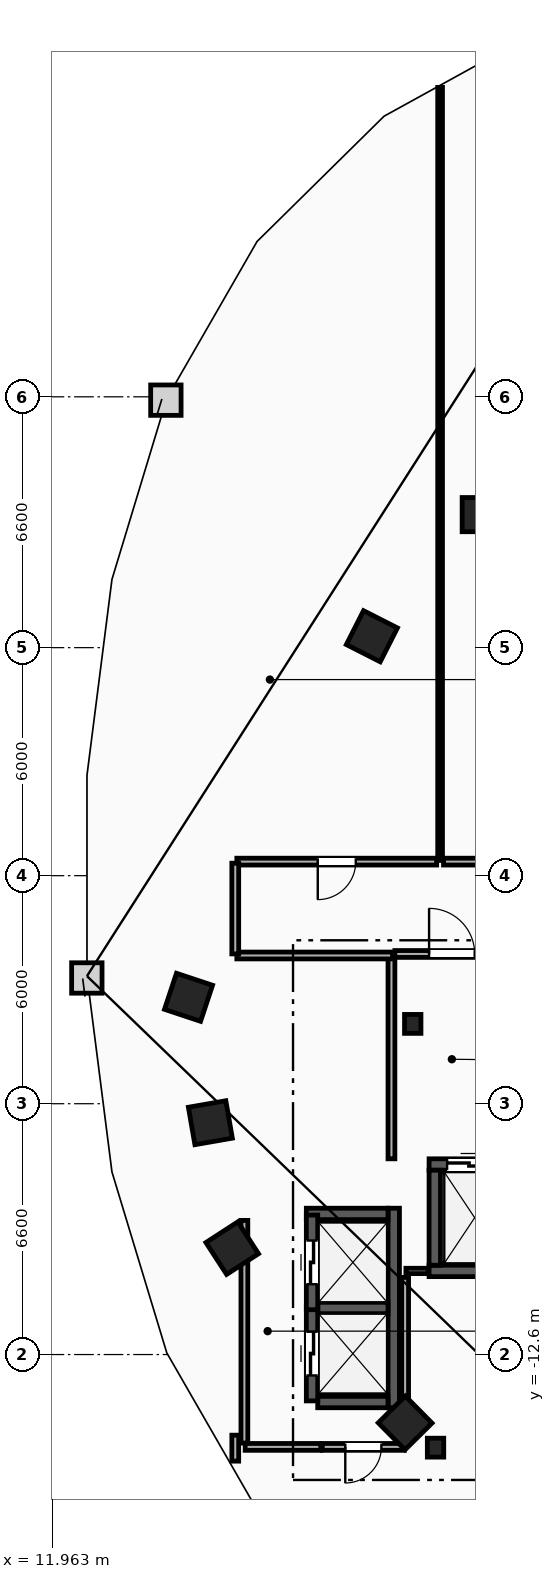
"""IFC4 building model, lengths in metres.
Left out: names, types, materials, properties, quantities, classifications, styles, units other than length and angle.
Written with IfcOpenShell. Run it as: python <this file> out.ifc"""

import sys

from ifc_helpers import new_model, si_unit, direction, frame, frame_2d, origin, origin_2d, place, context, subcontext, project, spatial, rectangle, i_section, extrude, element, fill, save


model = new_model("IFC4")
c1 = context("Model", 3, precision=1e-05, world=origin(), true_north=direction((0.0, 1.0)))
c2 = subcontext(c1, "Body", "Model", "MODEL_VIEW")
j1 = project(units=[si_unit("LENGTHUNIT", "METRE"), si_unit("PLANEANGLEUNIT", "RADIAN")], contexts=[c1])
p1 = place(None, origin())
s1 = spatial("IfcSite", under=j1, at=p1, CompositionType="ELEMENT")
p2 = place(p1, origin())
s2 = spatial("IfcBuilding", under=s1, at=p2, CompositionType="ELEMENT")
p3 = place(p2, frame((0.0, 0.0, 183.6)))
s3 = spatial("IfcBuildingStorey", under=s2, at=p3, CompositionType="ELEMENT", Elevation=183.6)
for number, where, z_axis, x_axis in (
    (1, (21.45, -3.9, 0.0), (0.0, 0.0, 1.0), (1.0, 0.0, 0.0)),
    (2, (22.05, -15.05, 0.0), (0.0, 0.0, 1.0), (1.0, 0.0, 0.0)),
):
    element("IfcColumn", number, at=place(p3, frame(where, z_axis=z_axis, x_axis=x_axis)), inside=s3, PredefinedType="COLUMN", context=c2, shape_type="SweptSolid", body=[
        extrude(i_section(OverallWidth=0.432, OverallDepth=0.498, WebThickness=0.056, FlangeThickness=0.089, FilletRadius=0.018, at=origin_2d()), origin(), (0.0, 0.0, 1.0), 3.6),
    ])
p4 = place(p3, frame((23.2, 9.5, 0.0), z_axis=(0.0, 0.0, 1.0), x_axis=(1.0, 0.0, 0.0)))
e3 = element("IfcColumn", 3, at=p4, inside=s3, PredefinedType="COLUMN", context=c2, shape_type="SweptSolid", body=[
    extrude(rectangle(XDim=0.9, YDim=0.9, at=origin_2d()), origin(), (0.0, 0.0, 1.0), 3.6),
])
for number, where, z_axis, x_axis in (
    (4, (15.55, -3.2, 0.0), (0.0, 0.0, 1.0), (-0.315, -0.949, 0.0)),
    (5, (16.125, -6.5, 0.0), (0.0, 0.0, 1.0), (0.172, -0.985, 0.0)),
    (6, (16.7, -9.8, 0.0), (0.0, 0.0, 1.0), (0.544, -0.839, 0.0)),
    (7, (21.25, -14.4, 0.0), (0.0, 0.0, 1.0), (0.703, -0.711, 0.0)),
    (8, (20.375, 6.3, 0.0), (0.0, 0.0, 1.0), (-0.453, -0.892, 0.0)),
):
    element("IfcColumn", number, at=place(p3, frame(where, z_axis=z_axis, x_axis=x_axis)), inside=s3, PredefinedType="COLUMN", context=c2, shape_type="SweptSolid", body=[
        extrude(rectangle(XDim=1.0, YDim=1.0, at=origin_2d()), origin(), (0.0, 0.0, 1.0), 3.6),
    ])
p5 = place(p3, frame((20.89, -7.45, 0.0), z_axis=(0.0, 0.0, 1.0), x_axis=(0.0, 1.0, 0.0)))
e9 = element("IfcWall", 9, at=p5, inside=s3, PredefinedType="PARTITIONING", context=c2, shape_type="SweptSolid", body=[
    extrude(rectangle(XDim=5.3, YDim=0.18, at=frame_2d((2.65, 0.0))), origin(), (0.0, 0.0, 1.0), 3.32),
])
p6 = place(p3, frame((20.98, -2.06, 0.0), z_axis=(0.0, 0.0, 1.0), x_axis=(1.0, 0.0, 0.0)))
e10 = element("IfcWall", 10, at=p6, inside=s3, PredefinedType="PARTITIONING", context=c2, shape_type="SweptSolid", body=[
    extrude(rectangle(XDim=3.0, YDim=0.18, at=frame_2d((1.5, 0.0))), origin(), (0.0, 0.0, 1.0), 3.32),
])
p7 = place(p6, frame((0.9, 0.0, 0.0)))
e11 = element("IfcOpeningElement", 11, at=p7, cuts=e10, PredefinedType="OPENING", context=c2, shape_type="SweptSolid", body=[
    extrude(rectangle(XDim=1.2, YDim=2.15, at=frame_2d((0.6, 1.075))), frame((0.0, 0.1, 0.0), z_axis=(0.0, -1.0, 0.0), x_axis=(1.0, 0.0, 0.0)), (0.0, 0.0, 1.0), 0.2),
])
p8 = place(p3, frame((21.88, -7.6, 0.0), z_axis=(0.0, 0.0, 1.0), x_axis=(1.0, 0.0, 0.0)))
e12 = element("IfcWall", 12, at=p8, inside=s3, PredefinedType="SHEAR", context=c2, shape_type="SweptSolid", body=[
    extrude(rectangle(XDim=2.1, YDim=0.3, at=frame_2d((1.05, 0.0))), origin(), (0.0, 0.0, 1.0), 3.32),
])
p9 = place(p8, frame((0.475, 0.0, 0.0)))
e13 = element("IfcOpeningElement", 13, at=p9, cuts=e12, PredefinedType="OPENING", context=c2, shape_type="SweptSolid", body=[
    extrude(rectangle(XDim=1.15, YDim=2.2, at=frame_2d((0.575, 1.1))), frame((0.0, 0.16, 0.0), z_axis=(0.0, -1.0, 0.0), x_axis=(1.0, 0.0, 0.0)), (0.0, 0.0, 1.0), 0.32),
])
p10 = place(p3, frame((21.88, -10.4, 0.0), z_axis=(0.0, 0.0, 1.0), x_axis=(1.0, 0.0, 0.0)))
e14 = element("IfcWall", 14, at=p10, inside=s3, PredefinedType="SHEAR", context=c2, shape_type="SweptSolid", body=[
    extrude(rectangle(XDim=2.1, YDim=0.3, at=frame_2d((1.05, 0.0))), origin(), (0.0, 0.0, 1.0), 3.32),
])
p11 = place(p3, frame((22.03, -10.25, 0.0), z_axis=(0.0, 0.0, 1.0), x_axis=(0.0, 1.0, 0.0)))
e15 = element("IfcWall", 15, at=p11, inside=s3, PredefinedType="SHEAR", context=c2, shape_type="SweptSolid", body=[
    extrude(rectangle(XDim=2.5, YDim=0.3, at=frame_2d((1.25, 0.0))), origin(), (0.0, 0.0, 1.0), 3.32),
])
p12 = place(p3, frame((20.95, -14.0, 0.0), z_axis=(0.0, 0.0, 1.0), x_axis=(0.0, 1.0, 0.0)))
e16 = element("IfcWall", 16, at=p12, inside=s3, PredefinedType="SHEAR", context=c2, shape_type="SweptSolid", body=[
    extrude(rectangle(XDim=5.25, YDim=0.3, at=frame_2d((2.625, 0.0))), origin(), (0.0, 0.0, 1.0), 3.32),
])
p13 = place(p3, frame((18.95, -13.85, 0.0), z_axis=(0.0, 0.0, 1.0), x_axis=(1.0, 0.0, 0.0)))
e17 = element("IfcWall", 17, at=p13, inside=s3, PredefinedType="SHEAR", context=c2, shape_type="SweptSolid", body=[
    extrude(rectangle(XDim=1.85, YDim=0.3, at=frame_2d((0.925, 0.0))), origin(), (0.0, 0.0, 1.0), 3.32),
])
p14 = place(p3, frame((18.65, -8.9, 0.0), z_axis=(0.0, 0.0, 1.0), x_axis=(1.0, 0.0, 0.0)))
e18 = element("IfcWall", 18, at=p14, inside=s3, PredefinedType="SHEAR", context=c2, shape_type="SweptSolid", body=[
    extrude(rectangle(XDim=2.15, YDim=0.3, at=frame_2d((1.075, 0.0))), origin(), (0.0, 0.0, 1.0), 3.32),
])
p15 = place(p3, frame((18.95, -11.375, 0.0), z_axis=(0.0, 0.0, 1.0), x_axis=(1.0, 0.0, 0.0)))
e19 = element("IfcWall", 19, at=p15, inside=s3, PredefinedType="SHEAR", context=c2, shape_type="SweptSolid", body=[
    extrude(rectangle(XDim=1.85, YDim=0.3, at=frame_2d((0.925, 0.0))), origin(), (0.0, 0.0, 1.0), 3.32),
])
p16 = place(p3, frame((18.8, -13.82, 0.0), z_axis=(0.0, 0.0, 1.0), x_axis=(0.0, 1.0, 0.0)))
e20 = element("IfcWall", 20, at=p16, inside=s3, PredefinedType="SHEAR", context=c2, shape_type="SweptSolid", body=[
    extrude(rectangle(XDim=2.49, YDim=0.3, at=frame_2d((1.245, 0.0))), origin(), (0.0, 0.0, 1.0), 3.32),
])
p17 = place(p16, frame((0.67, 0.0, 0.0)))
e21 = element("IfcOpeningElement", 21, at=p17, cuts=e20, PredefinedType="OPENING", context=c2, shape_type="SweptSolid", body=[
    extrude(rectangle(XDim=1.15, YDim=2.2, at=frame_2d((0.575, 1.1))), frame((0.0, 0.16, 0.0), z_axis=(0.0, -1.0, 0.0), x_axis=(1.0, 0.0, 0.0)), (0.0, 0.0, 1.0), 0.32),
])
p18 = place(p3, frame((18.8, -11.42, 0.0), z_axis=(0.0, 0.0, 1.0), x_axis=(0.0, 1.0, 0.0)))
e22 = element("IfcWall", 22, at=p18, inside=s3, PredefinedType="SHEAR", context=c2, shape_type="SweptSolid", body=[
    extrude(rectangle(XDim=2.49, YDim=0.3, at=frame_2d((1.245, 0.0))), origin(), (0.0, 0.0, 1.0), 3.32),
])
p19 = place(p18, frame((0.67, 0.0, 0.0)))
e23 = element("IfcOpeningElement", 23, at=p19, cuts=e22, PredefinedType="OPENING", context=c2, shape_type="SweptSolid", body=[
    extrude(rectangle(XDim=1.15, YDim=2.2, at=frame_2d((0.575, 1.1))), frame((0.0, 0.16, 0.0), z_axis=(0.0, -1.0, 0.0), x_axis=(1.0, 0.0, 0.0)), (0.0, 0.0, 1.0), 0.32),
])
p20 = place(p3, frame((17.02, -14.93, 0.0), z_axis=(0.0, 0.0, 1.0), x_axis=(0.0, 1.0, 0.0)))
e24 = element("IfcWall", 24, at=p20, inside=s3, PredefinedType="PARTITIONING", context=c2, shape_type="SweptSolid", body=[
    extrude(rectangle(XDim=5.86, YDim=0.18, at=frame_2d((2.93, 0.0))), origin(), (0.0, 0.0, 1.0), 3.32),
])
p21 = place(p3, frame((17.04, -15.03, 0.0), z_axis=(0.0, 0.0, 1.0), x_axis=(1.0, 0.0, 0.0)))
e25 = element("IfcWall", 25, at=p21, inside=s3, PredefinedType="PARTITIONING", context=c2, shape_type="SweptSolid", body=[
    extrude(rectangle(XDim=1.99, YDim=0.18, at=frame_2d((0.995, 0.0))), origin(), (0.0, 0.0, 1.0), 3.32),
])
p22 = place(p3, frame((21.23, -15.03, 0.0), z_axis=(0.0, 0.0, 1.0), x_axis=(-1.0, 0.0, 0.0)))
e26 = element("IfcWall", 26, at=p22, inside=s3, PredefinedType="PARTITIONING", context=c2, shape_type="SweptSolid", body=[
    extrude(rectangle(XDim=2.16, YDim=0.18, at=frame_2d((1.08, 0.0))), origin(), (0.0, 0.0, 1.0), 3.32),
])
p23 = place(p22, frame((0.605, 0.0, 0.0)))
e27 = element("IfcOpeningElement", 27, at=p23, cuts=e26, PredefinedType="OPENING", context=c2, shape_type="SweptSolid", body=[
    extrude(rectangle(XDim=0.95, YDim=2.1, at=frame_2d((0.475, 1.05))), frame((0.0, 0.1, 0.0), z_axis=(0.0, -1.0, 0.0), x_axis=(1.0, 0.0, 0.0)), (0.0, 0.0, 1.0), 0.2),
])
p24 = place(p3, frame((21.27, -10.4, 0.0), z_axis=(0.0, 0.0, 1.0), x_axis=(1.0, 0.0, 0.0)))
e28 = element("IfcWall", 28, at=p24, inside=s3, PredefinedType="PARTITIONING", context=c2, shape_type="SweptSolid", body=[
    extrude(rectangle(XDim=0.59, YDim=0.14, at=frame_2d((0.295, 0.0))), origin(), (0.0, 0.0, 1.0), 3.32),
])
p25 = place(p3, frame((21.25, -14.93, 0.0), z_axis=(0.0, 0.0, 1.0), x_axis=(0.0, 1.0, 0.0)))
e29 = element("IfcWall", 29, at=p25, inside=s3, PredefinedType="PARTITIONING", context=c2, shape_type="SweptSolid", body=[
    extrude(rectangle(XDim=4.36, YDim=0.18, at=frame_2d((2.18, 0.0))), origin(), (0.0, 0.0, 1.0), 3.32),
])
p26 = place(p3, frame((22.17, 0.4, 0.0), z_axis=(0.0, 0.0, 1.0), x_axis=(0.0, 1.0, 0.0)))
e30 = element("IfcWall", 30, at=p26, inside=s3, PredefinedType="PARTITIONING", context=c2, shape_type="SweptSolid", body=[
    extrude(rectangle(XDim=20.342, YDim=0.125, at=frame_2d((10.171, 0.0))), origin(), (0.0, 0.0, 1.0), 2.625),
])
p27 = place(p3, frame((22.08, 0.37, 0.0), z_axis=(0.0, 0.0, 1.0), x_axis=(-1.0, 0.0, 0.0)))
e31 = element("IfcWall", 31, at=p27, inside=s3, PredefinedType="PARTITIONING", context=c2, shape_type="SweptSolid", body=[
    extrude(rectangle(XDim=5.259, YDim=0.18, at=frame_2d((2.629, 0.0))), origin(), (0.0, 0.0, 1.0), 3.32),
])
p28 = place(p27, frame((2.129, 0.0, 0.0)))
e32 = element("IfcOpeningElement", 32, at=p28, cuts=e31, PredefinedType="OPENING", context=c2, shape_type="SweptSolid", body=[
    extrude(rectangle(XDim=1.0, YDim=2.15, at=frame_2d((0.5, 1.075))), frame((0.0, 0.1, 0.0), z_axis=(0.0, -1.0, 0.0), x_axis=(1.0, 0.0, 0.0)), (0.0, 0.0, 1.0), 0.2),
])
p29 = place(p3, frame((16.822, -2.1, 0.0), z_axis=(0.0, 0.0, 1.0), x_axis=(1.0, 0.0, 0.0)))
e33 = element("IfcWall", 33, at=p29, inside=s3, PredefinedType="PARTITIONING", context=c2, shape_type="SweptSolid", body=[
    extrude(rectangle(XDim=4.098, YDim=0.18, at=frame_2d((2.049, 0.0))), origin(), (0.0, 0.0, 1.0), 3.32),
])
p30 = place(p3, frame((16.78, 0.329, 0.0), z_axis=(0.0, 0.0, 1.0), x_axis=(0.0, -1.0, 0.0)))
e34 = element("IfcWall", 34, at=p30, inside=s3, PredefinedType="PARTITIONING", context=c2, shape_type="SweptSolid", body=[
    extrude(rectangle(XDim=2.387, YDim=0.18, at=frame_2d((1.194, 0.0))), origin(), (0.0, 0.0, 1.0), 3.32),
])
p31 = place(p3, frame((16.78, -14.721, 0.0), z_axis=(0.0, 0.0, 1.0), x_axis=(0.0, -1.0, 0.0)))
e35 = element("IfcWall", 35, at=p31, inside=s3, PredefinedType="PARTITIONING", context=c2, shape_type="SweptSolid", body=[
    extrude(rectangle(XDim=0.684, YDim=0.18, at=frame_2d((0.342, 0.0))), origin(), (0.0, 0.0, 1.0), 3.32),
])
p32 = place(p3, frame((25.4, 0.37, 0.0), z_axis=(0.0, 0.0, 1.0), x_axis=(-1.0, 0.0, 0.0)))
e36 = element("IfcWall", 36, at=p32, inside=s3, PredefinedType="PARTITIONING", context=c2, shape_type="SweptSolid", body=[
    extrude(rectangle(XDim=3.14, YDim=0.18, at=frame_2d((1.57, 0.0))), origin(), (0.0, 0.0, 1.0), 3.32),
])
p33 = place(p7, origin())
e37 = element("IfcDoor", 37, at=p33, inside=s3, OperationType="SINGLE_SWING_LEFT", PredefinedType="DOOR", context=c2, shape_type="SweptSolid", body=[
    extrude(rectangle(XDim=1.2, YDim=2.15, at=frame_2d((0.6, 1.075))), frame((0.0, 0.025, 0.0), z_axis=(0.0, -1.0, 0.0), x_axis=(1.0, 0.0, 0.0)), (0.0, 0.0, 1.0), 0.05),
])
fill(e11, e37)
p34 = place(p9, origin())
e38 = element("IfcDoor", 38, at=p34, inside=s3, OperationType="SLIDING_TO_LEFT", PredefinedType="TRAPDOOR", context=c2, shape_type="SweptSolid", body=[
    extrude(rectangle(XDim=1.15, YDim=2.2, at=frame_2d((0.575, 1.1))), frame((0.0, 0.025, 0.0), z_axis=(0.0, -1.0, 0.0), x_axis=(1.0, 0.0, 0.0)), (0.0, 0.0, 1.0), 0.05),
])
fill(e13, e38)
p35 = place(p17, origin())
e39 = element("IfcDoor", 39, at=p35, inside=s3, OperationType="SLIDING_TO_LEFT", PredefinedType="TRAPDOOR", context=c2, shape_type="SweptSolid", body=[
    extrude(rectangle(XDim=1.15, YDim=2.2, at=frame_2d((0.575, 1.1))), frame((0.0, 0.025, 0.0), z_axis=(0.0, -1.0, 0.0), x_axis=(1.0, 0.0, 0.0)), (0.0, 0.0, 1.0), 0.05),
])
fill(e21, e39)
p36 = place(p19, origin())
e40 = element("IfcDoor", 40, at=p36, inside=s3, OperationType="SLIDING_TO_LEFT", PredefinedType="TRAPDOOR", context=c2, shape_type="SweptSolid", body=[
    extrude(rectangle(XDim=1.15, YDim=2.2, at=frame_2d((0.575, 1.1))), frame((0.0, 0.025, 0.0), z_axis=(0.0, -1.0, 0.0), x_axis=(1.0, 0.0, 0.0)), (0.0, 0.0, 1.0), 0.05),
])
fill(e23, e40)
p37 = place(p28, origin())
e41 = element("IfcDoor", 41, at=p37, inside=s3, OperationType="SINGLE_SWING_RIGHT", PredefinedType="DOOR", context=c2, shape_type="SweptSolid", body=[
    extrude(rectangle(XDim=1.0, YDim=2.15, at=frame_2d((0.5, 1.075))), frame((0.0, 0.025, 0.0), z_axis=(0.0, -1.0, 0.0), x_axis=(1.0, 0.0, 0.0)), (0.0, 0.0, 1.0), 0.05),
])
fill(e32, e41)
p38 = place(p23, origin())
e42 = element("IfcDoor", 42, at=p38, inside=s3, OperationType="SINGLE_SWING_RIGHT", PredefinedType="DOOR", context=c2, shape_type="SweptSolid", body=[
    extrude(rectangle(XDim=0.95, YDim=2.1, at=frame_2d((0.475, 1.05))), frame((0.0, 0.025, 0.0), z_axis=(0.0, -1.0, 0.0), x_axis=(1.0, 0.0, 0.0)), (0.0, 0.0, 1.0), 0.05),
])
fill(e27, e42)
save(model, sys.argv[1])
